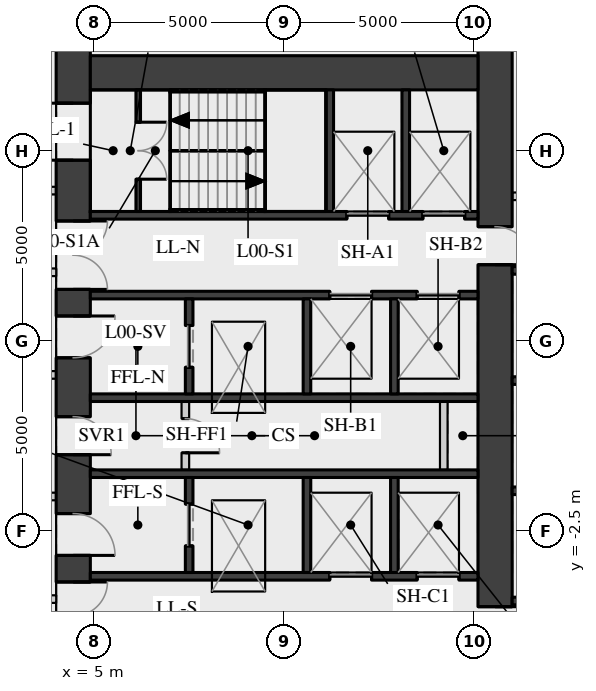
"""IFC4 building model, lengths in metres.
Left out: names, types, materials, properties, quantities, classifications, styles, units other than length and angle.
Written with IfcOpenShell. Run it as: python <this file> out.ifc"""

import sys

from ifc_helpers import new_model, si_unit, direction, frame, frame_2d, origin, place, context, subcontext, project, spatial, rectangle, extrude, element, fill, save


model = new_model("IFC4")
c1 = context("Model", 3, precision=1e-05, world=origin(), true_north=direction((0.0, 1.0)))
c2 = subcontext(c1, "Body", "Model", "MODEL_VIEW")
j1 = project(units=[si_unit("LENGTHUNIT", "METRE"), si_unit("PLANEANGLEUNIT", "RADIAN")], contexts=[c1])
p1 = place(None, origin())
s1 = spatial("IfcSite", under=j1, at=p1, CompositionType="ELEMENT")
p2 = place(p1, origin())
s2 = spatial("IfcBuilding", under=s1, at=p2, CompositionType="ELEMENT")
p3 = place(p2, origin())
s3 = spatial("IfcBuildingStorey", under=s2, at=p3, CompositionType="ELEMENT", Elevation=0.0)
p4 = place(p3, frame((4.45, -11.1, 0.0), z_axis=(0.0, 0.0, 1.0), x_axis=(0.0, 1.0, 0.0)))
e1 = element("IfcWall", 1, at=p4, inside=s3, PredefinedType="SHEAR", context=c2, shape_type="SweptSolid", body=[
    extrude(rectangle(XDim=22.2, YDim=0.9, at=frame_2d((11.1, 0.0))), origin(), (0.0, 0.0, 1.0), 7.09),
])
p5 = place(p4, frame((2.35, 0.0, 0.0)))
e2 = element("IfcOpeningElement", 2, at=p5, cuts=e1, PredefinedType="OPENING", context=c2, shape_type="SweptSolid", body=[
    extrude(rectangle(XDim=1.5, YDim=2.1, at=frame_2d((0.75, 1.05))), frame((0.0, 0.46, 0.0), z_axis=(0.0, -1.0, 0.0), x_axis=(1.0, 0.0, 0.0)), (0.0, 0.0, 1.0), 0.92),
])
p6 = place(p4, frame((5.45, 0.0, 0.0)))
e3 = element("IfcOpeningElement", 3, at=p6, cuts=e1, PredefinedType="OPENING", context=c2, shape_type="SweptSolid", body=[
    extrude(rectangle(XDim=1.8, YDim=2.1, at=frame_2d((0.9, 1.05))), frame((0.0, 0.46, 0.0), z_axis=(0.0, -1.0, 0.0), x_axis=(1.0, 0.0, 0.0)), (0.0, 0.0, 1.0), 0.92),
])
p7 = place(p4, frame((7.95, 0.0, 0.0)))
e4 = element("IfcOpeningElement", 4, at=p7, cuts=e1, PredefinedType="OPENING", context=c2, shape_type="SweptSolid", body=[
    extrude(rectangle(XDim=1.1, YDim=2.1, at=frame_2d((0.55, 1.05))), frame((0.0, 0.46, 0.0), z_axis=(0.0, -1.0, 0.0), x_axis=(1.0, 0.0, 0.0)), (0.0, 0.0, 1.0), 0.92),
])
p8 = place(p4, frame((10.6, 0.0, 0.0)))
e5 = element("IfcOpeningElement", 5, at=p8, cuts=e1, PredefinedType="OPENING", context=c2, shape_type="SweptSolid", body=[
    extrude(rectangle(XDim=1.0, YDim=2.1, at=frame_2d((0.5, 1.05))), frame((0.0, 0.46, 0.0), z_axis=(0.0, -1.0, 0.0), x_axis=(1.0, 0.0, 0.0)), (0.0, 0.0, 1.0), 0.92),
])
p9 = place(p4, frame((13.15, 0.0, 0.0)))
e6 = element("IfcOpeningElement", 6, at=p9, cuts=e1, PredefinedType="OPENING", context=c2, shape_type="SweptSolid", body=[
    extrude(rectangle(XDim=1.1, YDim=2.1, at=frame_2d((0.55, 1.05))), frame((0.0, 0.46, 0.0), z_axis=(0.0, -1.0, 0.0), x_axis=(1.0, 0.0, 0.0)), (0.0, 0.0, 1.0), 0.92),
])
p10 = place(p4, frame((14.95, 0.0, 0.0)))
e7 = element("IfcOpeningElement", 7, at=p10, cuts=e1, PredefinedType="OPENING", context=c2, shape_type="SweptSolid", body=[
    extrude(rectangle(XDim=1.8, YDim=2.1, at=frame_2d((0.9, 1.05))), frame((0.0, 0.46, 0.0), z_axis=(0.0, -1.0, 0.0), x_axis=(1.0, 0.0, 0.0)), (0.0, 0.0, 1.0), 0.92),
])
p11 = place(p4, frame((18.35, 0.0, 0.0)))
e8 = element("IfcOpeningElement", 8, at=p11, cuts=e1, PredefinedType="OPENING", context=c2, shape_type="SweptSolid", body=[
    extrude(rectangle(XDim=1.5, YDim=2.1, at=frame_2d((0.75, 1.05))), frame((0.0, 0.46, 0.0), z_axis=(0.0, -1.0, 0.0), x_axis=(1.0, 0.0, 0.0)), (0.0, 0.0, 1.0), 0.92),
])
p12 = place(p3, frame((15.55, -11.1, 0.0), z_axis=(0.0, 0.0, 1.0), x_axis=(0.0, 1.0, 0.0)))
e9 = element("IfcWall", 9, at=p12, inside=s3, PredefinedType="SHEAR", context=c2, shape_type="SweptSolid", body=[
    extrude(rectangle(XDim=22.2, YDim=0.9, at=frame_2d((11.1, 0.0))), origin(), (0.0, 0.0, 1.0), 7.09),
])
p13 = place(p12, frame((15.6, 0.0, 0.0)))
e10 = element("IfcOpeningElement", 10, at=p13, cuts=e9, PredefinedType="OPENING", context=c2, shape_type="SweptSolid", body=[
    extrude(rectangle(XDim=1.0, YDim=2.1, at=frame_2d((0.5, 1.05))), frame((0.0, 0.46, 0.0), z_axis=(0.0, -1.0, 0.0), x_axis=(1.0, 0.0, 0.0)), (0.0, 0.0, 1.0), 0.92),
])
p14 = place(p12, frame((5.6, 0.0, 0.0)))
e11 = element("IfcOpeningElement", 11, at=p14, cuts=e9, PredefinedType="OPENING", context=c2, shape_type="SweptSolid", body=[
    extrude(rectangle(XDim=1.0, YDim=2.1, at=frame_2d((0.5, 1.05))), frame((0.0, 0.46, 0.0), z_axis=(0.0, -1.0, 0.0), x_axis=(1.0, 0.0, 0.0)), (0.0, 0.0, 1.0), 0.92),
])
p15 = place(p3, frame((4.9, 9.55, 0.0), z_axis=(0.0, 0.0, 1.0), x_axis=(1.0, 0.0, 0.0)))
e12 = element("IfcWall", 12, at=p15, inside=s3, PredefinedType="SHEAR", context=c2, shape_type="SweptSolid", body=[
    extrude(rectangle(XDim=10.2, YDim=0.9, at=frame_2d((5.1, 0.0))), origin(), (0.0, 0.0, 1.0), 7.09),
])
p16 = place(p3, frame((4.9, 5.8, 0.0), z_axis=(0.0, 0.0, 1.0), x_axis=(1.0, 0.0, 0.0)))
e13 = element("IfcWall", 13, at=p16, inside=s3, PredefinedType="SHEAR", context=c2, shape_type="SweptSolid", body=[
    extrude(rectangle(XDim=10.2, YDim=0.2, at=frame_2d((5.1, 0.0))), origin(), (0.0, 0.0, 1.0), 7.09),
])
p17 = place(p16, frame((6.75, 0.0, 0.0)))
e14 = element("IfcOpeningElement", 14, at=p17, cuts=e13, PredefinedType="OPENING", context=c2, shape_type="SweptSolid", body=[
    extrude(rectangle(XDim=1.1, YDim=2.1, at=frame_2d((0.55, 1.05))), frame((0.0, 0.11, 0.0), z_axis=(0.0, -1.0, 0.0), x_axis=(1.0, 0.0, 0.0)), (0.0, 0.0, 1.0), 0.22),
])
p18 = place(p16, frame((8.75, 0.0, 0.0)))
e15 = element("IfcOpeningElement", 15, at=p18, cuts=e13, PredefinedType="OPENING", context=c2, shape_type="SweptSolid", body=[
    extrude(rectangle(XDim=1.1, YDim=2.1, at=frame_2d((0.55, 1.05))), frame((0.0, 0.11, 0.0), z_axis=(0.0, -1.0, 0.0), x_axis=(1.0, 0.0, 0.0)), (0.0, 0.0, 1.0), 0.22),
])
p19 = place(p3, frame((4.9, 3.7, 0.0), z_axis=(0.0, 0.0, 1.0), x_axis=(1.0, 0.0, 0.0)))
e16 = element("IfcWall", 16, at=p19, inside=s3, PredefinedType="SHEAR", context=c2, shape_type="SweptSolid", body=[
    extrude(rectangle(XDim=10.2, YDim=0.2, at=frame_2d((5.1, 0.0))), origin(), (0.0, 0.0, 1.0), 7.09),
])
p20 = place(p19, frame((6.3, 0.0, 0.0)))
e17 = element("IfcOpeningElement", 17, at=p20, cuts=e16, PredefinedType="OPENING", context=c2, shape_type="SweptSolid", body=[
    extrude(rectangle(XDim=1.1, YDim=2.1, at=frame_2d((0.55, 1.05))), frame((0.0, 0.11, 0.0), z_axis=(0.0, -1.0, 0.0), x_axis=(1.0, 0.0, 0.0)), (0.0, 0.0, 1.0), 0.22),
])
p21 = place(p19, frame((8.6, 0.0, 0.0)))
e18 = element("IfcOpeningElement", 18, at=p21, cuts=e16, PredefinedType="OPENING", context=c2, shape_type="SweptSolid", body=[
    extrude(rectangle(XDim=1.1, YDim=2.1, at=frame_2d((0.55, 1.05))), frame((0.0, 0.11, 0.0), z_axis=(0.0, -1.0, 0.0), x_axis=(1.0, 0.0, 0.0)), (0.0, 0.0, 1.0), 0.22),
])
for number, where, z_axis, x_axis in (
    (19, (4.9, 1.0, 0.0), (0.0, 0.0, 1.0), (1.0, 0.0, 0.0)),
    (20, (4.9, -1.0, 0.0), (0.0, 0.0, 1.0), (1.0, 0.0, 0.0)),
):
    element("IfcWall", number, at=place(p3, frame(where, z_axis=z_axis, x_axis=x_axis)), inside=s3, PredefinedType="SHEAR", context=c2, shape_type="SweptSolid", body=[
        extrude(rectangle(XDim=10.2, YDim=0.2, at=frame_2d((5.1, 0.0))), origin(), (0.0, 0.0, 1.0), 7.09),
    ])
p22 = place(p3, frame((4.9, -3.7, 0.0), z_axis=(0.0, 0.0, 1.0), x_axis=(1.0, 0.0, 0.0)))
e21 = element("IfcWall", 21, at=p22, inside=s3, PredefinedType="SHEAR", context=c2, shape_type="SweptSolid", body=[
    extrude(rectangle(XDim=10.2, YDim=0.2, at=frame_2d((5.1, 0.0))), origin(), (0.0, 0.0, 1.0), 7.09),
])
p23 = place(p22, frame((6.3, 0.0, 0.0)))
e22 = element("IfcOpeningElement", 22, at=p23, cuts=e21, PredefinedType="OPENING", context=c2, shape_type="SweptSolid", body=[
    extrude(rectangle(XDim=1.1, YDim=2.1, at=frame_2d((0.55, 1.05))), frame((0.0, 0.11, 0.0), z_axis=(0.0, -1.0, 0.0), x_axis=(1.0, 0.0, 0.0)), (0.0, 0.0, 1.0), 0.22),
])
p24 = place(p22, frame((8.6, 0.0, 0.0)))
e23 = element("IfcOpeningElement", 23, at=p24, cuts=e21, PredefinedType="OPENING", context=c2, shape_type="SweptSolid", body=[
    extrude(rectangle(XDim=1.1, YDim=2.1, at=frame_2d((0.55, 1.05))), frame((0.0, 0.11, 0.0), z_axis=(0.0, -1.0, 0.0), x_axis=(1.0, 0.0, 0.0)), (0.0, 0.0, 1.0), 0.22),
])
for number, where, z_axis, x_axis in (
    (24, (11.2, 5.9, 0.0), (0.0, 0.0, 1.0), (0.0, 1.0, 0.0)),
    (25, (13.2, 5.9, 0.0), (0.0, 0.0, 1.0), (0.0, 1.0, 0.0)),
):
    element("IfcWall", number, at=place(p3, frame(where, z_axis=z_axis, x_axis=x_axis)), inside=s3, PredefinedType="SHEAR", context=c2, shape_type="SweptSolid", body=[
        extrude(rectangle(XDim=3.2, YDim=0.2, at=frame_2d((1.6, 0.0))), origin(), (0.0, 0.0, 1.0), 7.09),
    ])
p25 = place(p3, frame((7.5, 1.1, 0.0), z_axis=(0.0, 0.0, 1.0), x_axis=(0.0, 1.0, 0.0)))
e26 = element("IfcWall", 26, at=p25, inside=s3, PredefinedType="SHEAR", context=c2, shape_type="SweptSolid", body=[
    extrude(rectangle(XDim=2.5, YDim=0.2, at=frame_2d((1.25, 0.0))), origin(), (0.0, 0.0, 1.0), 7.09),
])
p26 = place(p25, frame((0.7, 0.0, 0.0)))
e27 = element("IfcOpeningElement", 27, at=p26, cuts=e26, PredefinedType="OPENING", context=c2, shape_type="SweptSolid", body=[
    extrude(rectangle(XDim=1.1, YDim=2.1, at=frame_2d((0.55, 1.05))), frame((0.0, 0.11, 0.0), z_axis=(0.0, -1.0, 0.0), x_axis=(1.0, 0.0, 0.0)), (0.0, 0.0, 1.0), 0.22),
])
p27 = place(p3, frame((7.5, -3.6, 0.0), z_axis=(0.0, 0.0, 1.0), x_axis=(0.0, 1.0, 0.0)))
e28 = element("IfcWall", 28, at=p27, inside=s3, PredefinedType="SHEAR", context=c2, shape_type="SweptSolid", body=[
    extrude(rectangle(XDim=2.5, YDim=0.2, at=frame_2d((1.25, 0.0))), origin(), (0.0, 0.0, 1.0), 7.09),
])
p28 = place(p27, frame((0.7, 0.0, 0.0)))
e29 = element("IfcOpeningElement", 29, at=p28, cuts=e28, PredefinedType="OPENING", context=c2, shape_type="SweptSolid", body=[
    extrude(rectangle(XDim=1.1, YDim=2.1, at=frame_2d((0.55, 1.05))), frame((0.0, 0.11, 0.0), z_axis=(0.0, -1.0, 0.0), x_axis=(1.0, 0.0, 0.0)), (0.0, 0.0, 1.0), 0.22),
])
for number, where, z_axis, x_axis in (
    (30, (10.6, 1.1, 0.0), (0.0, 0.0, 1.0), (0.0, 1.0, 0.0)),
    (31, (10.6, -3.6, 0.0), (0.0, 0.0, 1.0), (0.0, 1.0, 0.0)),
    (32, (12.9, 1.1, 0.0), (0.0, 0.0, 1.0), (0.0, 1.0, 0.0)),
    (33, (12.9, -3.6, 0.0), (0.0, 0.0, 1.0), (0.0, 1.0, 0.0)),
):
    element("IfcWall", number, at=place(p3, frame(where, z_axis=z_axis, x_axis=x_axis)), inside=s3, PredefinedType="SHEAR", context=c2, shape_type="SweptSolid", body=[
        extrude(rectangle(XDim=2.5, YDim=0.2, at=frame_2d((1.25, 0.0))), origin(), (0.0, 0.0, 1.0), 7.09),
    ])
p29 = place(p3, frame((6.16, 5.9, 0.0), z_axis=(0.0, 0.0, 1.0), x_axis=(0.0, 1.0, 0.0)))
e34 = element("IfcWall", 34, at=p29, inside=s3, PredefinedType="SHEAR", context=c2, shape_type="SweptSolid", body=[
    extrude(rectangle(XDim=3.2, YDim=0.12, at=frame_2d((1.6, 0.0))), origin(), (0.0, 0.0, 1.0), 3.54),
])
p30 = place(p29, frame((0.85, 0.0, 0.0)))
e35 = element("IfcOpeningElement", 35, at=p30, cuts=e34, PredefinedType="OPENING", context=c2, shape_type="SweptSolid", body=[
    extrude(rectangle(XDim=1.5, YDim=2.1, at=frame_2d((0.75, 1.05))), frame((0.0, 0.07, 0.0), z_axis=(0.0, -1.0, 0.0), x_axis=(1.0, 0.0, 0.0)), (0.0, 0.0, 1.0), 0.14),
])
p31 = place(p3, frame((7.4, -0.9, 0.0), z_axis=(0.0, 0.0, 1.0), x_axis=(0.0, 1.0, 0.0)))
e36 = element("IfcWall", 36, at=p31, inside=s3, PredefinedType="PARTITIONING", context=c2, shape_type="SweptSolid", body=[
    extrude(rectangle(XDim=1.8, YDim=0.2, at=frame_2d((0.9, 0.0))), origin(), (0.0, 0.0, 1.0), 7.09),
])
p32 = place(p31, frame((0.45, 0.0, 0.0)))
e37 = element("IfcOpeningElement", 37, at=p32, cuts=e36, PredefinedType="OPENING", context=c2, shape_type="SweptSolid", body=[
    extrude(rectangle(XDim=0.9, YDim=2.1, at=frame_2d((0.45, 1.05))), frame((0.0, 0.11, 0.0), z_axis=(0.0, -1.0, 0.0), x_axis=(1.0, 0.0, 0.0)), (0.0, 0.0, 1.0), 0.22),
])
p33 = place(p3, frame((14.2, -0.9, 0.0), z_axis=(0.0, 0.0, 1.0), x_axis=(0.0, 1.0, 0.0)))
e38 = element("IfcWall", 38, at=p33, inside=s3, PredefinedType="PARTITIONING", context=c2, shape_type="SweptSolid", body=[
    extrude(rectangle(XDim=1.8, YDim=0.2, at=frame_2d((0.9, 0.0))), origin(), (0.0, 0.0, 1.0), 7.09),
])
for number, where, z_axis, x_axis in (
    (39, (16.0, -4.35, 0.0), (0.0, 0.0, 1.0), (1.0, 0.0, 0.0)),
    (40, (16.0, -1.45, 0.0), (0.0, 0.0, 1.0), (1.0, 0.0, 0.0)),
    (41, (16.0, 1.45, 0.0), (0.0, 0.0, 1.0), (1.0, 0.0, 0.0)),
    (42, (16.0, 4.35, 0.0), (0.0, 0.0, 1.0), (1.0, 0.0, 0.0)),
):
    element("IfcWall", number, at=place(p3, frame(where, z_axis=z_axis, x_axis=x_axis)), inside=s3, PredefinedType="SHEAR", context=c2, shape_type="SweptSolid", body=[
        extrude(rectangle(XDim=2.3, YDim=0.2, at=frame_2d((1.15, 0.0))), origin(), (0.0, 0.0, 1.0), 7.09),
    ])
p34 = place(p3, frame((16.0, 6.3, 0.0), z_axis=(0.0, 0.0, 1.0), x_axis=(1.0, 0.0, 0.0)))
e43 = element("IfcWall", 43, at=p34, inside=s3, PredefinedType="PARTITIONING", context=c2, shape_type="SweptSolid", body=[
    extrude(rectangle(XDim=2.3, YDim=0.2, at=frame_2d((1.15, 0.0))), origin(), (0.0, 0.0, 1.0), 7.09),
])
p35 = place(p34, frame((0.3, 0.0, 0.0)))
e44 = element("IfcOpeningElement", 44, at=p35, cuts=e43, PredefinedType="OPENING", context=c2, shape_type="SweptSolid", body=[
    extrude(rectangle(XDim=0.9, YDim=2.1, at=frame_2d((0.45, 1.05))), frame((0.0, 0.11, 0.0), z_axis=(0.0, -1.0, 0.0), x_axis=(1.0, 0.0, 0.0)), (0.0, 0.0, 1.0), 0.22),
])
p36 = place(p3, frame((0.9, -4.3, 0.0), z_axis=(0.0, 0.0, 1.0), x_axis=(1.0, 0.0, 0.0)))
e45 = element("IfcWall", 45, at=p36, inside=s3, PredefinedType="PARTITIONING", context=c2, shape_type="SweptSolid", body=[
    extrude(rectangle(XDim=3.102, YDim=0.2, at=frame_2d((1.551, 0.0))), origin(), (0.0, 0.0, 1.0), 7.09),
])
p37 = place(p36, frame((1.051, 0.0, 0.0)))
e46 = element("IfcOpeningElement", 46, at=p37, cuts=e45, PredefinedType="OPENING", context=c2, shape_type="SweptSolid", body=[
    extrude(rectangle(XDim=1.0, YDim=2.1, at=frame_2d((0.5, 1.05))), frame((0.0, 0.11, 0.0), z_axis=(0.0, -1.0, 0.0), x_axis=(1.0, 0.0, 0.0)), (0.0, 0.0, 1.0), 0.22),
])
p38 = place(p3, frame((1.1, -1.6, 0.0), z_axis=(0.0, 0.0, 1.0), x_axis=(1.0, 0.0, 0.0)))
e47 = element("IfcWall", 47, at=p38, inside=s3, PredefinedType="PARTITIONING", context=c2, shape_type="SweptSolid", body=[
    extrude(rectangle(XDim=2.902, YDim=0.2, at=frame_2d((1.451, 0.0))), origin(), (0.0, 0.0, 1.0), 7.09),
])
p39 = place(p3, frame((0.9, 1.6, 0.0), z_axis=(0.0, 0.0, 1.0), x_axis=(1.0, 0.0, 0.0)))
e48 = element("IfcWall", 48, at=p39, inside=s3, PredefinedType="PARTITIONING", context=c2, shape_type="SweptSolid", body=[
    extrude(rectangle(XDim=3.102, YDim=0.2, at=frame_2d((1.551, 0.0))), origin(), (0.0, 0.0, 1.0), 7.09),
])
p40 = place(p39, frame((1.051, 0.0, 0.0)))
e49 = element("IfcOpeningElement", 49, at=p40, cuts=e48, PredefinedType="OPENING", context=c2, shape_type="SweptSolid", body=[
    extrude(rectangle(XDim=1.0, YDim=2.1, at=frame_2d((0.5, 1.05))), frame((0.0, 0.11, 0.0), z_axis=(0.0, -1.0, 0.0), x_axis=(1.0, 0.0, 0.0)), (0.0, 0.0, 1.0), 0.22),
])
p41 = place(p3, frame((1.1, 4.3, 0.0), z_axis=(0.0, 0.0, 1.0), x_axis=(1.0, 0.0, 0.0)))
e50 = element("IfcWall", 50, at=p41, inside=s3, PredefinedType="PARTITIONING", context=c2, shape_type="SweptSolid", body=[
    extrude(rectangle(XDim=2.902, YDim=0.2, at=frame_2d((1.451, 0.0))), origin(), (0.0, 0.0, 1.0), 7.09),
])
p42 = place(p3, frame((-14.6, 6.45, 0.0), z_axis=(0.0, 0.0, 1.0), x_axis=(1.0, 0.0, 0.0)))
e51 = element("IfcWall", 51, at=p42, inside=s3, PredefinedType="PARTITIONING", context=c2, shape_type="SweptSolid", body=[
    extrude(rectangle(XDim=18.602, YDim=0.2, at=frame_2d((9.301, 0.0))), origin(), (0.0, 0.0, 1.0), 7.09),
])
p43 = place(p42, frame((8.101, 0.0, 0.0)))
e52 = element("IfcOpeningElement", 52, at=p43, cuts=e51, PredefinedType="OPENING", context=c2, shape_type="SweptSolid", body=[
    extrude(rectangle(XDim=2.4, YDim=2.4, at=frame_2d((1.2, 1.2))), frame((0.0, 0.11, 0.0), z_axis=(0.0, -1.0, 0.0), x_axis=(1.0, 0.0, 0.0)), (0.0, 0.0, 1.0), 0.22),
])
p44 = place(p6, origin())
e53 = element("IfcDoor", 53, at=p44, inside=s3, OperationType="DOUBLE_DOOR_SINGLE_SWING", PredefinedType="DOOR", context=c2, shape_type="SweptSolid", body=[
    extrude(rectangle(XDim=1.8, YDim=2.1, at=frame_2d((0.9, 1.05))), frame((0.0, 0.025, 0.0), z_axis=(0.0, -1.0, 0.0), x_axis=(1.0, 0.0, 0.0)), (0.0, 0.0, 1.0), 0.05),
])
fill(e3, e53)
p45 = place(p7, origin())
e54 = element("IfcDoor", 54, at=p45, inside=s3, OperationType="SINGLE_SWING_RIGHT", PredefinedType="DOOR", context=c2, shape_type="SweptSolid", body=[
    extrude(rectangle(XDim=1.1, YDim=2.1, at=frame_2d((0.55, 1.05))), frame((0.0, 0.025, 0.0), z_axis=(0.0, -1.0, 0.0), x_axis=(1.0, 0.0, 0.0)), (0.0, 0.0, 1.0), 0.05),
])
fill(e4, e54)
p46 = place(p8, origin())
e55 = element("IfcDoor", 55, at=p46, inside=s3, OperationType="SINGLE_SWING_RIGHT", PredefinedType="DOOR", context=c2, shape_type="SweptSolid", body=[
    extrude(rectangle(XDim=1.0, YDim=2.1, at=frame_2d((0.5, 1.05))), frame((0.0, 0.025, 0.0), z_axis=(0.0, -1.0, 0.0), x_axis=(1.0, 0.0, 0.0)), (0.0, 0.0, 1.0), 0.05),
])
fill(e5, e55)
p47 = place(p9, origin())
e56 = element("IfcDoor", 56, at=p47, inside=s3, OperationType="SINGLE_SWING_LEFT", PredefinedType="DOOR", context=c2, shape_type="SweptSolid", body=[
    extrude(rectangle(XDim=1.1, YDim=2.1, at=frame_2d((0.55, 1.05))), frame((0.0, 0.025, 0.0), z_axis=(0.0, -1.0, 0.0), x_axis=(1.0, 0.0, 0.0)), (0.0, 0.0, 1.0), 0.05),
])
fill(e6, e56)
p48 = place(p10, origin())
e57 = element("IfcDoor", 57, at=p48, inside=s3, OperationType="DOUBLE_DOOR_SINGLE_SWING", PredefinedType="DOOR", context=c2, shape_type="SweptSolid", body=[
    extrude(rectangle(XDim=1.8, YDim=2.1, at=frame_2d((0.9, 1.05))), frame((0.0, 0.025, 0.0), z_axis=(0.0, -1.0, 0.0), x_axis=(1.0, 0.0, 0.0)), (0.0, 0.0, 1.0), 0.05),
])
fill(e7, e57)
p49 = place(p11, origin())
e58 = element("IfcDoor", 58, at=p49, inside=s3, OperationType="DOUBLE_DOOR_SINGLE_SWING", PredefinedType="DOOR", context=c2, shape_type="SweptSolid", body=[
    extrude(rectangle(XDim=1.5, YDim=2.1, at=frame_2d((0.75, 1.05))), frame((0.0, 0.025, 0.0), z_axis=(0.0, -1.0, 0.0), x_axis=(1.0, 0.0, 0.0)), (0.0, 0.0, 1.0), 0.05),
])
fill(e8, e58)
p50 = place(p30, origin())
e59 = element("IfcDoor", 59, at=p50, inside=s3, OperationType="DOUBLE_DOOR_SINGLE_SWING", PredefinedType="DOOR", context=c2, shape_type="SweptSolid", body=[
    extrude(rectangle(XDim=1.5, YDim=2.1, at=frame_2d((0.75, 1.05))), frame((0.0, 0.025, 0.0), z_axis=(0.0, -1.0, 0.0), x_axis=(1.0, 0.0, 0.0)), (0.0, 0.0, 1.0), 0.05),
])
fill(e35, e59)
p51 = place(p17, origin())
e60 = element("IfcDoor", 60, at=p51, inside=s3, OperationType="DOUBLE_DOOR_SLIDING", PredefinedType="DOOR", context=c2, shape_type="SweptSolid", body=[
    extrude(rectangle(XDim=1.1, YDim=2.1, at=frame_2d((0.55, 1.05))), frame((0.0, 0.025, 0.0), z_axis=(0.0, -1.0, 0.0), x_axis=(1.0, 0.0, 0.0)), (0.0, 0.0, 1.0), 0.05),
])
fill(e14, e60)
p52 = place(p18, origin())
e61 = element("IfcDoor", 61, at=p52, inside=s3, OperationType="DOUBLE_DOOR_SLIDING", PredefinedType="DOOR", context=c2, shape_type="SweptSolid", body=[
    extrude(rectangle(XDim=1.1, YDim=2.1, at=frame_2d((0.55, 1.05))), frame((0.0, 0.025, 0.0), z_axis=(0.0, -1.0, 0.0), x_axis=(1.0, 0.0, 0.0)), (0.0, 0.0, 1.0), 0.05),
])
fill(e15, e61)
p53 = place(p20, origin())
e62 = element("IfcDoor", 62, at=p53, inside=s3, OperationType="DOUBLE_DOOR_SLIDING", PredefinedType="DOOR", context=c2, shape_type="SweptSolid", body=[
    extrude(rectangle(XDim=1.1, YDim=2.1, at=frame_2d((0.55, 1.05))), frame((0.0, 0.025, 0.0), z_axis=(0.0, -1.0, 0.0), x_axis=(1.0, 0.0, 0.0)), (0.0, 0.0, 1.0), 0.05),
])
fill(e17, e62)
p54 = place(p21, origin())
e63 = element("IfcDoor", 63, at=p54, inside=s3, OperationType="DOUBLE_DOOR_SLIDING", PredefinedType="DOOR", context=c2, shape_type="SweptSolid", body=[
    extrude(rectangle(XDim=1.1, YDim=2.1, at=frame_2d((0.55, 1.05))), frame((0.0, 0.025, 0.0), z_axis=(0.0, -1.0, 0.0), x_axis=(1.0, 0.0, 0.0)), (0.0, 0.0, 1.0), 0.05),
])
fill(e18, e63)
p55 = place(p23, origin())
e64 = element("IfcDoor", 64, at=p55, inside=s3, OperationType="DOUBLE_DOOR_SLIDING", PredefinedType="DOOR", context=c2, shape_type="SweptSolid", body=[
    extrude(rectangle(XDim=1.1, YDim=2.1, at=frame_2d((0.55, 1.05))), frame((0.0, 0.025, 0.0), z_axis=(0.0, -1.0, 0.0), x_axis=(1.0, 0.0, 0.0)), (0.0, 0.0, 1.0), 0.05),
])
fill(e22, e64)
p56 = place(p24, origin())
e65 = element("IfcDoor", 65, at=p56, inside=s3, OperationType="DOUBLE_DOOR_SLIDING", PredefinedType="DOOR", context=c2, shape_type="SweptSolid", body=[
    extrude(rectangle(XDim=1.1, YDim=2.1, at=frame_2d((0.55, 1.05))), frame((0.0, 0.025, 0.0), z_axis=(0.0, -1.0, 0.0), x_axis=(1.0, 0.0, 0.0)), (0.0, 0.0, 1.0), 0.05),
])
fill(e23, e65)
p57 = place(p26, origin())
e66 = element("IfcDoor", 66, at=p57, inside=s3, OperationType="DOUBLE_DOOR_SLIDING", PredefinedType="DOOR", context=c2, shape_type="SweptSolid", body=[
    extrude(rectangle(XDim=1.1, YDim=2.1, at=frame_2d((0.55, 1.05))), frame((0.0, 0.025, 0.0), z_axis=(0.0, -1.0, 0.0), x_axis=(1.0, 0.0, 0.0)), (0.0, 0.0, 1.0), 0.05),
])
fill(e27, e66)
p58 = place(p28, origin())
e67 = element("IfcDoor", 67, at=p58, inside=s3, OperationType="DOUBLE_DOOR_SLIDING", PredefinedType="DOOR", context=c2, shape_type="SweptSolid", body=[
    extrude(rectangle(XDim=1.1, YDim=2.1, at=frame_2d((0.55, 1.05))), frame((0.0, 0.025, 0.0), z_axis=(0.0, -1.0, 0.0), x_axis=(1.0, 0.0, 0.0)), (0.0, 0.0, 1.0), 0.05),
])
fill(e29, e67)
p59 = place(p32, origin())
e68 = element("IfcDoor", 68, at=p59, inside=s3, OperationType="SINGLE_SWING_RIGHT", PredefinedType="DOOR", context=c2, shape_type="SweptSolid", body=[
    extrude(rectangle(XDim=0.9, YDim=2.1, at=frame_2d((0.45, 1.05))), frame((0.0, 0.025, 0.0), z_axis=(0.0, -1.0, 0.0), x_axis=(1.0, 0.0, 0.0)), (0.0, 0.0, 1.0), 0.05),
])
fill(e37, e68)
p60 = place(p13, origin())
e69 = element("IfcDoor", 69, at=p60, inside=s3, OperationType="SINGLE_SWING_RIGHT", PredefinedType="DOOR", context=c2, shape_type="SweptSolid", body=[
    extrude(rectangle(XDim=1.0, YDim=2.1, at=frame_2d((0.5, 1.05))), frame((0.0, 0.025, 0.0), z_axis=(0.0, -1.0, 0.0), x_axis=(1.0, 0.0, 0.0)), (0.0, 0.0, 1.0), 0.05),
])
fill(e10, e69)
p61 = place(p14, origin())
e70 = element("IfcDoor", 70, at=p61, inside=s3, OperationType="SINGLE_SWING_LEFT", PredefinedType="DOOR", context=c2, shape_type="SweptSolid", body=[
    extrude(rectangle(XDim=1.0, YDim=2.1, at=frame_2d((0.5, 1.05))), frame((0.0, 0.025, 0.0), z_axis=(0.0, -1.0, 0.0), x_axis=(1.0, 0.0, 0.0)), (0.0, 0.0, 1.0), 0.05),
])
fill(e11, e70)
save(model, sys.argv[1])
